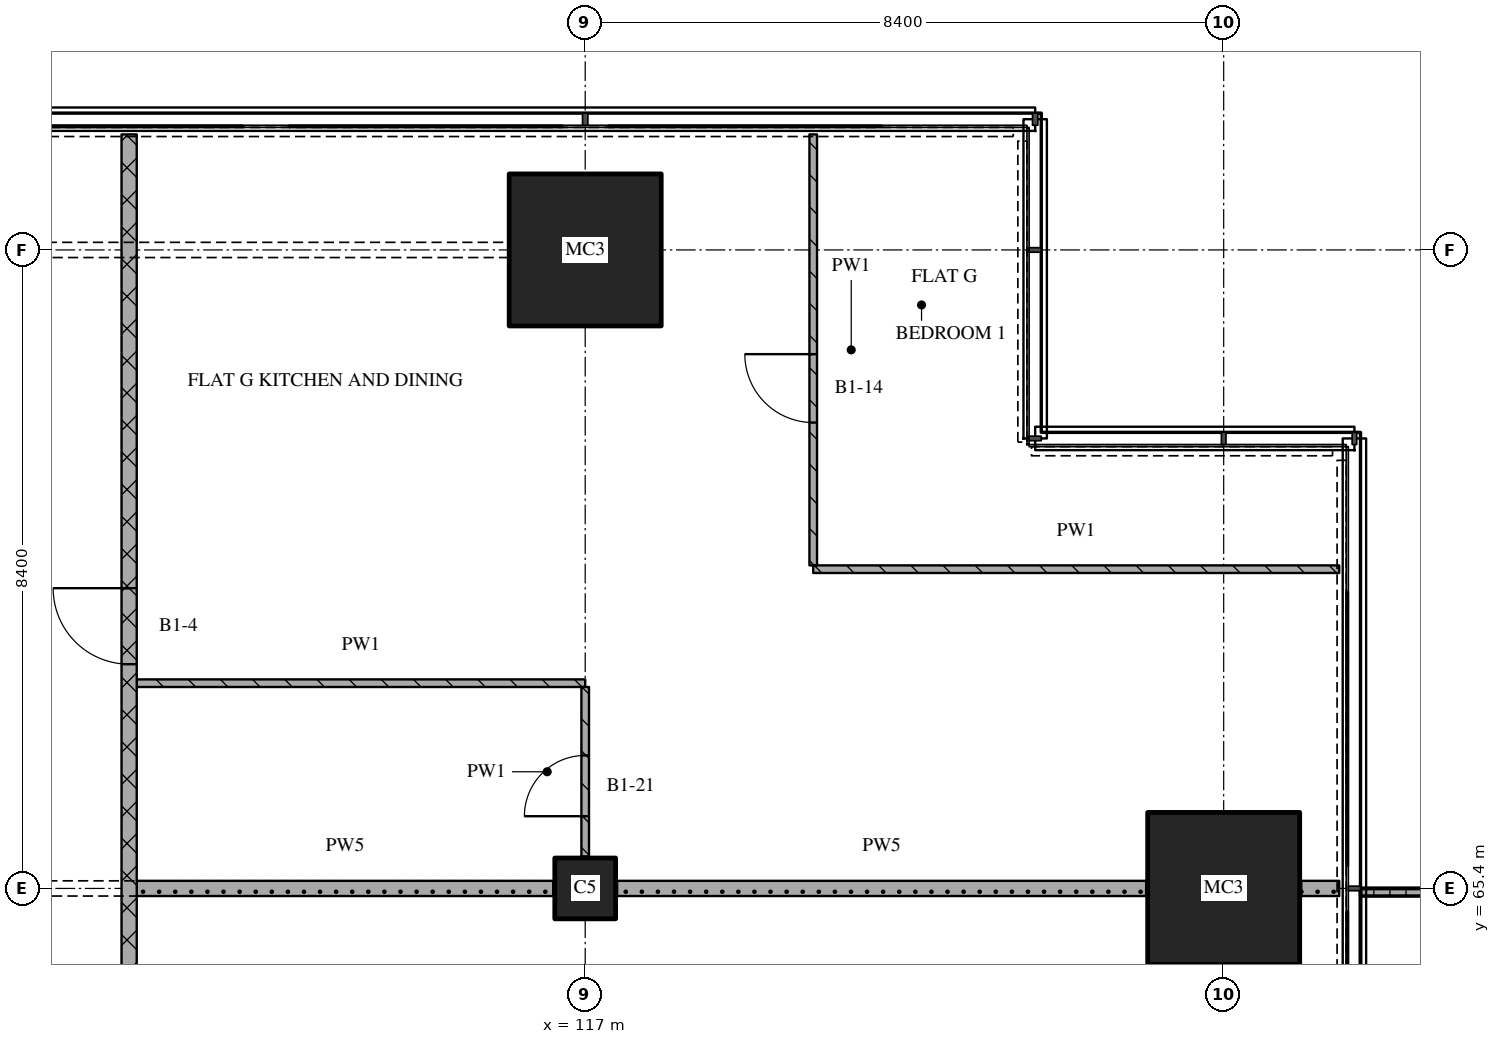
"""IFC4 building model, lengths in metres.
Left out: names, types, materials, properties, quantities, classifications, styles, units other than length and angle.
Written with IfcOpenShell. Run it as: python <this file> out.ifc"""

import sys

from ifc_helpers import new_model, si_unit, direction, frame, frame_2d, origin, origin_2d, place, context, subcontext, project, spatial, polyline, rectangle, outline, extrude, element, fill, save


model = new_model("IFC4")
c1 = context("Model", 3, precision=1e-05, world=origin(), true_north=direction((0.0, 1.0)))
c2 = subcontext(c1, "Body", "Model", "MODEL_VIEW")
j1 = project(units=[si_unit("LENGTHUNIT", "METRE"), si_unit("PLANEANGLEUNIT", "RADIAN")], contexts=[c1])
p1 = place(None, origin())
s1 = spatial("IfcSite", under=j1, at=p1, CompositionType="ELEMENT")
p2 = place(p1, origin())
s2 = spatial("IfcBuilding", under=s1, at=p2, CompositionType="ELEMENT")
p3 = place(p2, frame((0.0, 0.0, 98.85)))
s3 = spatial("IfcBuildingStorey", under=s2, at=p3, CompositionType="ELEMENT", Elevation=98.85)
p4 = place(p3, frame((117.0, 65.4, 0.0), z_axis=(0.0, 0.0, 1.0), x_axis=(1.0, 0.0, 0.0)))
e1 = element("IfcColumn", 1, at=p4, inside=s3, PredefinedType="COLUMN", context=c2, shape_type="SweptSolid", body=[
    extrude(rectangle(XDim=0.8, YDim=0.8, at=origin_2d()), origin(), (0.0, 0.0, 1.0), 3.6),
])
for number, where, z_axis, x_axis in (
    (2, (117.0, 73.8, 0.0), (0.0, 0.0, 1.0), (1.0, 0.0, 0.0)),
    (3, (125.4, 65.4, 0.0), (0.0, 0.0, 1.0), (1.0, 0.0, 0.0)),
):
    element("IfcColumn", number, at=place(p3, frame(where, z_axis=z_axis, x_axis=x_axis)), inside=s3, PredefinedType="COLUMN", context=c2, shape_type="SweptSolid", body=[
        extrude(rectangle(XDim=2.0, YDim=2.0, at=origin_2d()), origin(), (0.0, 0.0, 1.0), 3.6),
    ])
p5 = place(p3, origin())
e4 = element("IfcWall", 4, at=p5, inside=s3, PredefinedType="SOLIDWALL", context=c2, shape_type="SweptSolid", body=[
    extrude(outline(polyline([(127.2, 61.2), (127.2, 61.3), (128.833, 61.3), (128.833, 65.3), (127.2, 65.3), (127.2, 65.4), (128.933, 65.4), (128.933, 61.2), (127.2, 61.2)])), origin(), (0.0, 0.0, 1.0), 1.0),
])
p6 = place(p3, frame((111.1, 65.4, 0.0), z_axis=(0.0, 0.0, 1.0), x_axis=(1.0, 0.0, 0.0)))
e5 = element("IfcWall", 5, at=p6, inside=s3, PredefinedType="PARTITIONING", context=c2, shape_type="SweptSolid", body=[
    extrude(rectangle(XDim=5.48, YDim=0.2, at=frame_2d((2.74, 0.0))), origin(), (0.0, 0.0, 1.0), 2.82),
])
p7 = place(p3, frame((117.42, 65.4, 0.0), z_axis=(0.0, 0.0, 1.0), x_axis=(1.0, 0.0, 0.0)))
e6 = element("IfcWall", 6, at=p7, inside=s3, PredefinedType="PARTITIONING", context=c2, shape_type="SweptSolid", body=[
    extrude(rectangle(XDim=6.96, YDim=0.2, at=frame_2d((3.48, 0.0))), origin(), (0.0, 0.0, 1.0), 3.32),
])
p8 = place(p3, frame((126.42, 65.4, 0.0), z_axis=(0.0, 0.0, 1.0), x_axis=(1.0, 0.0, 0.0)))
e7 = element("IfcWall", 7, at=p8, inside=s3, PredefinedType="PARTITIONING", context=c2, shape_type="SweptSolid", body=[
    extrude(rectangle(XDim=0.5, YDim=0.2, at=frame_2d((0.25, 0.0))), origin(), (0.0, 0.0, 1.0), 3.32),
])
p9 = place(p3, frame((111.1, 68.1, 0.0), z_axis=(0.0, 0.0, 1.0), x_axis=(1.0, 0.0, 0.0)))
e8 = element("IfcWall", 8, at=p9, inside=s3, PredefinedType="PARTITIONING", context=c2, shape_type="SweptSolid", body=[
    extrude(rectangle(XDim=5.9, YDim=0.1, at=frame_2d((2.95, 0.0))), origin(), (0.0, 0.0, 1.0), 3.32),
])
p10 = place(p3, frame((120.0, 69.6, 0.0), z_axis=(0.0, 0.0, 1.0), x_axis=(1.0, 0.0, 0.0)))
e9 = element("IfcWall", 9, at=p10, inside=s3, PredefinedType="PARTITIONING", context=c2, shape_type="SweptSolid", body=[
    extrude(rectangle(XDim=6.92, YDim=0.1, at=frame_2d((3.46, 0.0))), origin(), (0.0, 0.0, 1.0), 3.32),
])
p11 = place(p3, frame((111.0, 75.32, 0.0), z_axis=(0.0, 0.0, 1.0), x_axis=(0.0, -1.0, 0.0)))
e10 = element("IfcWall", 10, at=p11, inside=s3, PredefinedType="PARTITIONING", context=c2, shape_type="SweptSolid", body=[
    extrude(rectangle(XDim=32.02, YDim=0.2, at=frame_2d((16.01, 0.0))), origin(), (0.0, 0.0, 1.0), 3.32),
])
p12 = place(p11, frame((5.97, 0.0, 0.0)))
e11 = element("IfcOpeningElement", 11, at=p12, cuts=e10, PredefinedType="OPENING", context=c2, shape_type="SweptSolid", body=[
    extrude(rectangle(XDim=1.0, YDim=2.1, at=frame_2d((0.5, 1.05))), frame((0.0, 0.11, 0.0), z_axis=(0.0, -1.0, 0.0), x_axis=(1.0, 0.0, 0.0)), (0.0, 0.0, 1.0), 0.22),
])
p13 = place(p11, frame((13.52, 0.0, 0.0)))
e12 = element("IfcOpeningElement", 12, at=p13, cuts=e10, PredefinedType="OPENING", context=c2, shape_type="SweptSolid", body=[
    extrude(rectangle(XDim=1.2, YDim=2.1, at=frame_2d((0.6, 1.05))), frame((0.0, 0.11, 0.0), z_axis=(0.0, -1.0, 0.0), x_axis=(1.0, 0.0, 0.0)), (0.0, 0.0, 1.0), 0.22),
])
p14 = place(p11, frame((23.27, 0.0, 0.0)))
e13 = element("IfcOpeningElement", 13, at=p14, cuts=e10, PredefinedType="OPENING", context=c2, shape_type="SweptSolid", body=[
    extrude(rectangle(XDim=1.2, YDim=2.1, at=frame_2d((0.6, 1.05))), frame((0.0, 0.11, 0.0), z_axis=(0.0, -1.0, 0.0), x_axis=(1.0, 0.0, 0.0)), (0.0, 0.0, 1.0), 0.22),
])
p15 = place(p3, frame((117.0, 65.82, 0.0), z_axis=(0.0, 0.0, 1.0), x_axis=(0.0, 1.0, 0.0)))
e14 = element("IfcWall", 14, at=p15, inside=s3, PredefinedType="PARTITIONING", context=c2, shape_type="SweptSolid", body=[
    extrude(rectangle(XDim=2.23, YDim=0.1, at=frame_2d((1.115, 0.0))), origin(), (0.0, 0.0, 1.0), 3.32),
])
p16 = place(p15, frame((0.53, 0.0, 0.0)))
e15 = element("IfcOpeningElement", 15, at=p16, cuts=e14, PredefinedType="OPENING", context=c2, shape_type="SweptSolid", body=[
    extrude(rectangle(XDim=0.8, YDim=2.1, at=frame_2d((0.4, 1.05))), frame((0.0, 0.06, 0.0), z_axis=(0.0, -1.0, 0.0), x_axis=(1.0, 0.0, 0.0)), (0.0, 0.0, 1.0), 0.12),
])
p17 = place(p3, frame((120.0, 75.32, 0.0), z_axis=(0.0, 0.0, 1.0), x_axis=(0.0, -1.0, 0.0)))
e16 = element("IfcWall", 16, at=p17, inside=s3, PredefinedType="PARTITIONING", context=c2, shape_type="SweptSolid", body=[
    extrude(rectangle(XDim=5.67, YDim=0.1, at=frame_2d((2.835, 0.0))), origin(), (0.0, 0.0, 1.0), 3.32),
])
p18 = place(p17, frame((2.891, 0.0, 0.0)))
e17 = element("IfcOpeningElement", 17, at=p18, cuts=e16, PredefinedType="OPENING", context=c2, shape_type="SweptSolid", body=[
    extrude(rectangle(XDim=0.9, YDim=2.1, at=frame_2d((0.45, 1.05))), frame((0.0, 0.06, 0.0), z_axis=(0.0, -1.0, 0.0), x_axis=(1.0, 0.0, 0.0)), (0.0, 0.0, 1.0), 0.12),
])
p19 = place(p12, origin())
e18 = element("IfcDoor", 18, at=p19, inside=s3, OperationType="SINGLE_SWING_RIGHT", PredefinedType="DOOR", context=c2, shape_type="SweptSolid", body=[
    extrude(rectangle(XDim=1.0, YDim=2.1, at=frame_2d((0.5, 1.05))), frame((0.0, 0.025, 0.0), z_axis=(0.0, -1.0, 0.0), x_axis=(1.0, 0.0, 0.0)), (0.0, 0.0, 1.0), 0.05),
])
fill(e11, e18)
p20 = place(p16, origin())
e19 = element("IfcDoor", 19, at=p20, inside=s3, OperationType="SINGLE_SWING_LEFT", PredefinedType="DOOR", context=c2, shape_type="SweptSolid", body=[
    extrude(rectangle(XDim=0.8, YDim=2.1, at=frame_2d((0.4, 1.05))), frame((0.0, 0.025, 0.0), z_axis=(0.0, -1.0, 0.0), x_axis=(1.0, 0.0, 0.0)), (0.0, 0.0, 1.0), 0.05),
])
fill(e15, e19)
p21 = place(p18, origin())
e20 = element("IfcDoor", 20, at=p21, inside=s3, OperationType="SINGLE_SWING_RIGHT", PredefinedType="DOOR", context=c2, shape_type="SweptSolid", body=[
    extrude(rectangle(XDim=0.9, YDim=2.1, at=frame_2d((0.45, 1.05))), frame((0.0, 0.025, 0.0), z_axis=(0.0, -1.0, 0.0), x_axis=(1.0, 0.0, 0.0)), (0.0, 0.0, 1.0), 0.05),
])
fill(e17, e20)
save(model, sys.argv[1])
